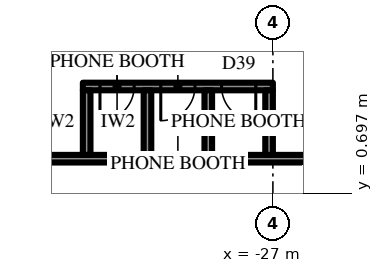
"""IFC4 building model, lengths in metres.
Left out: names, types, materials, properties, quantities, classifications, styles, units other than length and angle.
Written with IfcOpenShell. Run it as: python <this file> out.ifc"""

import sys

from ifc_helpers import new_model, si_unit, direction, frame, frame_2d, origin, place, context, subcontext, project, spatial, rectangle, extrude, element, fill, save


model = new_model("IFC4")
c1 = context("Model", 3, precision=1e-05, world=origin(), true_north=direction((0.0, 1.0)))
c2 = subcontext(c1, "Body", "Model", "MODEL_VIEW")
j1 = project(units=[si_unit("LENGTHUNIT", "METRE"), si_unit("PLANEANGLEUNIT", "RADIAN")], contexts=[c1])
p1 = place(None, origin())
s1 = spatial("IfcSite", under=j1, at=p1, CompositionType="ELEMENT")
p2 = place(p1, origin())
s2 = spatial("IfcBuilding", under=s1, at=p2, CompositionType="ELEMENT")
p3 = place(p2, frame((0.0, 0.0, 86.5)))
s3 = spatial("IfcBuildingStorey", under=s2, at=p3, CompositionType="ELEMENT", Elevation=86.5)
p4 = place(p3, frame((-21.1, 1.6, 0.0), z_axis=(0.0, 0.0, 1.0), x_axis=(-1.0, 0.0, 0.0)))
e1 = element("IfcWall", 1, at=p4, inside=s3, PredefinedType="PARTITIONING", context=c2, shape_type="SweptSolid", body=[
    extrude(rectangle(XDim=15.273, YDim=0.2, at=frame_2d((7.636, 0.0))), origin(), (0.0, 0.0, 1.0), 4.0),
])
p5 = place(p4, frame((1.027, 0.0, 0.0)))
e2 = element("IfcOpeningElement", 2, at=p5, cuts=e1, PredefinedType="OPENING", context=c2, shape_type="SweptSolid", body=[
    extrude(rectangle(XDim=1.0, YDim=2.2, at=frame_2d((0.5, 1.1))), frame((0.0, 0.11, 0.0), z_axis=(0.0, -1.0, 0.0), x_axis=(1.0, 0.0, 0.0)), (0.0, 0.0, 1.0), 0.22),
])
p6 = place(p3, frame((-27.0, 3.5, 0.0), z_axis=(0.0, 0.0, 1.0), x_axis=(-1.0, 0.0, 0.0)))
e3 = element("IfcWall", 3, at=p6, inside=s3, PredefinedType="PARTITIONING", context=c2, shape_type="SweptSolid", body=[
    extrude(rectangle(XDim=5.0, YDim=0.2, at=frame_2d((2.5, 0.0))), origin(), (0.0, 0.0, 1.0), 4.0),
])
p7 = place(p6, frame((0.45, 0.0, 0.0)))
e4 = element("IfcOpeningElement", 4, at=p7, cuts=e3, PredefinedType="OPENING", context=c2, shape_type="SweptSolid", body=[
    extrude(rectangle(XDim=0.9, YDim=2.2, at=frame_2d((0.45, 1.1))), frame((0.0, 0.11, 0.0), z_axis=(0.0, -1.0, 0.0), x_axis=(1.0, 0.0, 0.0)), (0.0, 0.0, 1.0), 0.22),
])
p8 = place(p6, frame((2.05, 0.0, 0.0)))
e5 = element("IfcOpeningElement", 5, at=p8, cuts=e3, PredefinedType="OPENING", context=c2, shape_type="SweptSolid", body=[
    extrude(rectangle(XDim=0.9, YDim=2.2, at=frame_2d((0.45, 1.1))), frame((0.0, 0.11, 0.0), z_axis=(0.0, -1.0, 0.0), x_axis=(1.0, 0.0, 0.0)), (0.0, 0.0, 1.0), 0.22),
])
p9 = place(p6, frame((3.65, 0.0, 0.0)))
e6 = element("IfcOpeningElement", 6, at=p9, cuts=e3, PredefinedType="OPENING", context=c2, shape_type="SweptSolid", body=[
    extrude(rectangle(XDim=0.9, YDim=2.2, at=frame_2d((0.45, 1.1))), frame((0.0, 0.11, 0.0), z_axis=(0.0, -1.0, 0.0), x_axis=(1.0, 0.0, 0.0)), (0.0, 0.0, 1.0), 0.22),
])
for number, where, z_axis, x_axis in (
    (7, (-27.1, 1.7, 0.0), (0.0, 0.0, 1.0), (0.0, 1.0, 0.0)),
    (8, (-28.7, 1.7, 0.0), (0.0, 0.0, 1.0), (0.0, 1.0, 0.0)),
    (9, (-30.3, 1.7, 0.0), (0.0, 0.0, 1.0), (0.0, 1.0, 0.0)),
    (10, (-31.9, 1.7, 0.0), (0.0, 0.0, 1.0), (0.0, 1.0, 0.0)),
):
    element("IfcWall", number, at=place(p3, frame(where, z_axis=z_axis, x_axis=x_axis)), inside=s3, PredefinedType="PARTITIONING", context=c2, shape_type="SweptSolid", body=[
        extrude(rectangle(XDim=1.7, YDim=0.2, at=frame_2d((0.85, 0.0))), origin(), (0.0, 0.0, 1.0), 4.0),
    ])
p10 = place(p7, origin())
e11 = element("IfcDoor", 11, at=p10, inside=s3, OperationType="SINGLE_SWING_RIGHT", PredefinedType="DOOR", context=c2, shape_type="SweptSolid", body=[
    extrude(rectangle(XDim=0.9, YDim=2.2, at=frame_2d((0.45, 1.1))), frame((0.0, 0.025, 0.0), z_axis=(0.0, -1.0, 0.0), x_axis=(1.0, 0.0, 0.0)), (0.0, 0.0, 1.0), 0.05),
])
fill(e4, e11)
p11 = place(p8, origin())
e12 = element("IfcDoor", 12, at=p11, inside=s3, OperationType="SINGLE_SWING_LEFT", PredefinedType="DOOR", context=c2, shape_type="SweptSolid", body=[
    extrude(rectangle(XDim=0.9, YDim=2.2, at=frame_2d((0.45, 1.1))), frame((0.0, 0.025, 0.0), z_axis=(0.0, -1.0, 0.0), x_axis=(1.0, 0.0, 0.0)), (0.0, 0.0, 1.0), 0.05),
])
fill(e5, e12)
p12 = place(p9, origin())
e13 = element("IfcDoor", 13, at=p12, inside=s3, OperationType="SINGLE_SWING_LEFT", PredefinedType="DOOR", context=c2, shape_type="SweptSolid", body=[
    extrude(rectangle(XDim=0.9, YDim=2.2, at=frame_2d((0.45, 1.1))), frame((0.0, 0.025, 0.0), z_axis=(0.0, -1.0, 0.0), x_axis=(1.0, 0.0, 0.0)), (0.0, 0.0, 1.0), 0.05),
])
fill(e6, e13)
save(model, sys.argv[1])
